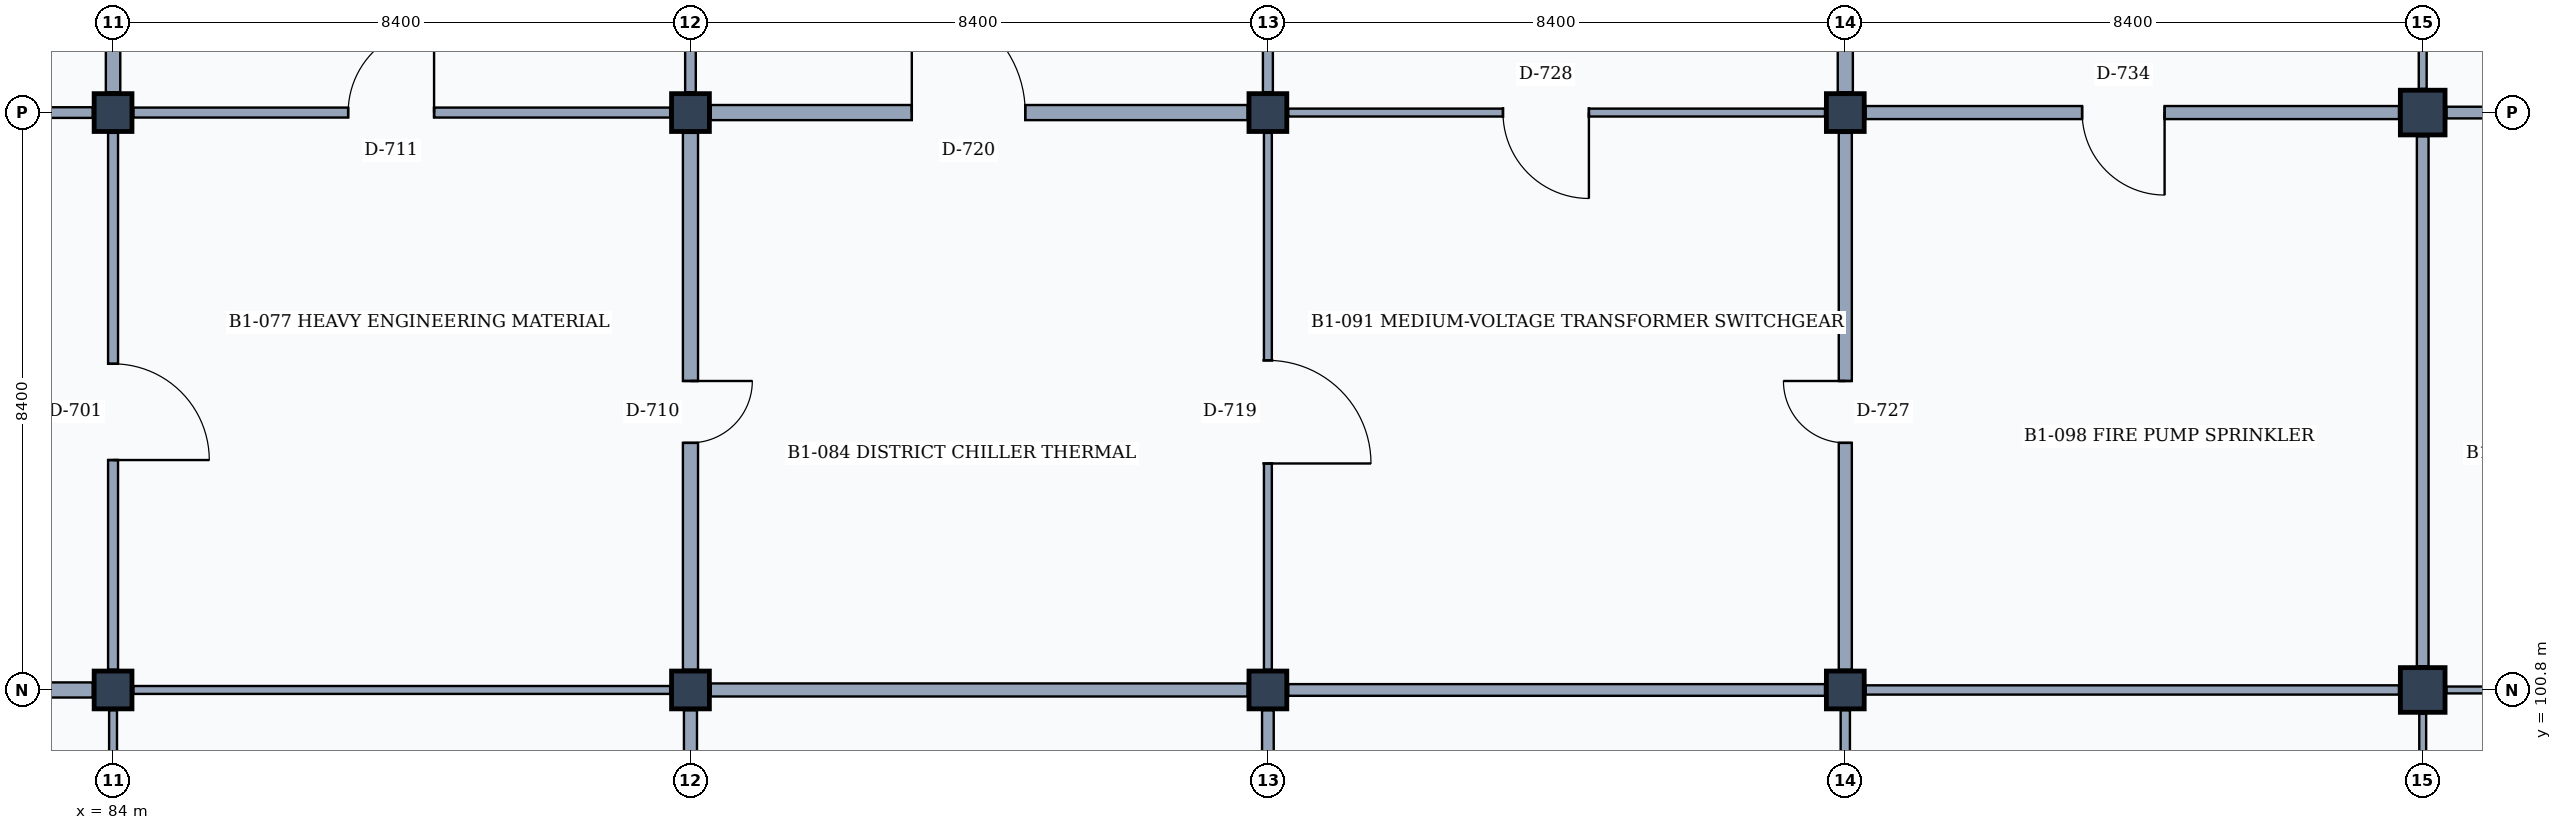
"""IFC4 building model, lengths in metres.
Left out: names, types, materials, properties, quantities, classifications, styles, units other than length and angle.
Written with IfcOpenShell. Run it as: python <this file> out.ifc"""

import sys

from ifc_helpers import new_model, si_unit, direction, frame, frame_2d, origin, origin_2d, place, context, subcontext, project, spatial, rectangle, extrude, element, fill, save


model = new_model("IFC4")
c1 = context("Model", 3, precision=1e-05, world=origin(), true_north=direction((0.0, 1.0)))
c2 = subcontext(c1, "Body", "Model", "MODEL_VIEW")
j1 = project(units=[si_unit("LENGTHUNIT", "METRE"), si_unit("PLANEANGLEUNIT", "RADIAN")], contexts=[c1])
p1 = place(None, origin())
s1 = spatial("IfcSite", under=j1, at=p1, CompositionType="ELEMENT")
p2 = place(p1, origin())
s2 = spatial("IfcBuilding", under=s1, at=p2, CompositionType="ELEMENT")
p3 = place(p2, frame((0.0, 0.0, -4.2)))
s3 = spatial("IfcBuildingStorey", under=s2, at=p3, CompositionType="ELEMENT", Elevation=-4.2)
for number, where, z_axis, x_axis in (
    (1, (84.0, 100.8, 0.0), (0.0, 0.0, 1.0), (1.0, 0.0, 0.0)),
    (2, (84.0, 109.2, 0.0), (0.0, 0.0, 1.0), (1.0, 0.0, 0.0)),
    (3, (92.4, 100.8, 0.0), (0.0, 0.0, 1.0), (1.0, 0.0, 0.0)),
    (4, (92.4, 109.2, 0.0), (0.0, 0.0, 1.0), (1.0, 0.0, 0.0)),
    (5, (100.8, 100.8, 0.0), (0.0, 0.0, 1.0), (1.0, 0.0, 0.0)),
    (6, (100.8, 109.2, 0.0), (0.0, 0.0, 1.0), (1.0, 0.0, 0.0)),
    (7, (109.2, 100.8, 0.0), (0.0, 0.0, 1.0), (1.0, 0.0, 0.0)),
    (8, (109.2, 109.2, 0.0), (0.0, 0.0, 1.0), (1.0, 0.0, 0.0)),
):
    element("IfcColumn", number, at=place(p3, frame(where, z_axis=z_axis, x_axis=x_axis)), inside=s3, PredefinedType="COLUMN", context=c2, shape_type="SweptSolid", body=[
        extrude(rectangle(XDim=0.55, YDim=0.55, at=origin_2d()), origin(), (0.0, 0.0, 1.0), 4.2),
    ])
for number, where, z_axis, x_axis in (
    (9, (117.6, 100.8, 0.0), (0.0, 0.0, 1.0), (1.0, 0.0, 0.0)),
    (10, (117.6, 109.2, 0.0), (0.0, 0.0, 1.0), (1.0, 0.0, 0.0)),
):
    element("IfcColumn", number, at=place(p3, frame(where, z_axis=z_axis, x_axis=x_axis)), inside=s3, PredefinedType="COLUMN", context=c2, shape_type="SweptSolid", body=[
        extrude(rectangle(XDim=0.65, YDim=0.65, at=origin_2d()), origin(), (0.0, 0.0, 1.0), 4.2),
    ])
p4 = place(p3, frame((84.0, 92.745, 0.0), z_axis=(0.0, 0.0, 1.0), x_axis=(0.0, 1.0, 0.0)))
e11 = element("IfcWall", 11, at=p4, inside=s3, PredefinedType="PARTITIONING", context=c2, shape_type="SweptSolid", body=[
    extrude(rectangle(XDim=7.76, YDim=0.115, at=frame_2d((3.88, 0.0))), origin(), (0.0, 0.0, 1.0), 3.23),
])
p5 = place(p4, frame((3.15, 0.0, 0.0)))
e12 = element("IfcOpeningElement", 12, at=p5, cuts=e11, PredefinedType="OPENING", context=c2, shape_type="SweptSolid", body=[
    extrude(rectangle(XDim=1.2, YDim=2.2, at=frame_2d((0.6, 1.1))), frame((0.0, 0.067, 0.0), z_axis=(0.0, -1.0, 0.0), x_axis=(1.0, 0.0, 0.0)), (0.0, 0.0, 1.0), 0.135),
])
p6 = place(p3, frame((75.895, 100.8, 0.0), z_axis=(0.0, 0.0, 1.0), x_axis=(1.0, 0.0, 0.0)))
e13 = element("IfcWall", 13, at=p6, inside=s3, PredefinedType="PARTITIONING", context=c2, shape_type="SweptSolid", body=[
    extrude(rectangle(XDim=7.81, YDim=0.22, at=frame_2d((3.905, 0.0))), origin(), (0.0, 0.0, 1.0), 2.93),
])
p7 = place(p3, frame((84.0, 101.095, 0.0), z_axis=(0.0, 0.0, 1.0), x_axis=(0.0, 1.0, 0.0)))
e14 = element("IfcWall", 14, at=p7, inside=s3, PredefinedType="PARTITIONING", context=c2, shape_type="SweptSolid", body=[
    extrude(rectangle(XDim=7.81, YDim=0.145, at=frame_2d((3.905, 0.0))), origin(), (0.0, 0.0, 1.0), 3.23),
])
p8 = place(p7, frame((3.05, 0.0, 0.0)))
e15 = element("IfcOpeningElement", 15, at=p8, cuts=e14, PredefinedType="OPENING", context=c2, shape_type="SweptSolid", body=[
    extrude(rectangle(XDim=1.4, YDim=2.25, at=frame_2d((0.7, 1.125))), frame((0.0, 0.083, 0.0), z_axis=(0.0, -1.0, 0.0), x_axis=(1.0, 0.0, 0.0)), (0.0, 0.0, 1.0), 0.165),
])
p9 = place(p3, frame((75.895, 109.2, 0.0), z_axis=(0.0, 0.0, 1.0), x_axis=(1.0, 0.0, 0.0)))
e16 = element("IfcWall", 16, at=p9, inside=s3, PredefinedType="PARTITIONING", context=c2, shape_type="SweptSolid", body=[
    extrude(rectangle(XDim=7.81, YDim=0.155, at=frame_2d((3.905, 0.0))), origin(), (0.0, 0.0, 1.0), 2.93),
])
p10 = place(p9, frame((3.0, 0.0, 0.0)))
e17 = element("IfcOpeningElement", 17, at=p10, cuts=e16, PredefinedType="OPENING", context=c2, shape_type="SweptSolid", body=[
    extrude(rectangle(XDim=1.5, YDim=2.3, at=frame_2d((0.75, 1.15))), frame((0.0, 0.087, 0.0), z_axis=(0.0, -1.0, 0.0), x_axis=(1.0, 0.0, 0.0)), (0.0, 0.0, 1.0), 0.175),
])
p11 = place(p3, frame((84.0, 109.495, 0.0), z_axis=(0.0, 0.0, 1.0), x_axis=(0.0, 1.0, 0.0)))
e18 = element("IfcWall", 18, at=p11, inside=s3, PredefinedType="PARTITIONING", context=c2, shape_type="SweptSolid", body=[
    extrude(rectangle(XDim=7.81, YDim=0.21, at=frame_2d((3.905, 0.0))), origin(), (0.0, 0.0, 1.0), 3.23),
])
p12 = place(p3, frame((92.4, 92.745, 0.0), z_axis=(0.0, 0.0, 1.0), x_axis=(0.0, 1.0, 0.0)))
e19 = element("IfcWall", 19, at=p12, inside=s3, PredefinedType="PARTITIONING", context=c2, shape_type="SweptSolid", body=[
    extrude(rectangle(XDim=7.76, YDim=0.19, at=frame_2d((3.88, 0.0))), origin(), (0.0, 0.0, 1.0), 3.23),
])
p13 = place(p12, frame((2.8, 0.0, 0.0)))
e20 = element("IfcOpeningElement", 20, at=p13, cuts=e19, PredefinedType="OPENING", context=c2, shape_type="SweptSolid", body=[
    extrude(rectangle(XDim=1.9, YDim=2.4, at=frame_2d((0.95, 1.2))), frame((0.0, 0.105, 0.0), z_axis=(0.0, -1.0, 0.0), x_axis=(1.0, 0.0, 0.0)), (0.0, 0.0, 1.0), 0.21),
])
p14 = place(p3, frame((84.295, 100.8, 0.0), z_axis=(0.0, 0.0, 1.0), x_axis=(1.0, 0.0, 0.0)))
e21 = element("IfcWall", 21, at=p14, inside=s3, PredefinedType="PARTITIONING", context=c2, shape_type="SweptSolid", body=[
    extrude(rectangle(XDim=7.81, YDim=0.115, at=frame_2d((3.905, 0.0))), origin(), (0.0, 0.0, 1.0), 2.93),
])
p15 = place(p3, frame((92.4, 101.095, 0.0), z_axis=(0.0, 0.0, 1.0), x_axis=(0.0, 1.0, 0.0)))
e22 = element("IfcWall", 22, at=p15, inside=s3, PredefinedType="PARTITIONING", context=c2, shape_type="SweptSolid", body=[
    extrude(rectangle(XDim=7.81, YDim=0.22, at=frame_2d((3.905, 0.0))), origin(), (0.0, 0.0, 1.0), 3.23),
])
p16 = place(p15, frame((3.3, 0.0, 0.0)))
e23 = element("IfcOpeningElement", 23, at=p16, cuts=e22, PredefinedType="OPENING", context=c2, shape_type="SweptSolid", body=[
    extrude(rectangle(XDim=0.9, YDim=2.1, at=frame_2d((0.45, 1.05))), frame((0.0, 0.12, 0.0), z_axis=(0.0, -1.0, 0.0), x_axis=(1.0, 0.0, 0.0)), (0.0, 0.0, 1.0), 0.24),
])
p17 = place(p3, frame((84.295, 109.2, 0.0), z_axis=(0.0, 0.0, 1.0), x_axis=(1.0, 0.0, 0.0)))
e24 = element("IfcWall", 24, at=p17, inside=s3, PredefinedType="PARTITIONING", context=c2, shape_type="SweptSolid", body=[
    extrude(rectangle(XDim=7.81, YDim=0.145, at=frame_2d((3.905, 0.0))), origin(), (0.0, 0.0, 1.0), 2.93),
])
p18 = place(p17, frame((3.125, 0.0, 0.0)))
e25 = element("IfcOpeningElement", 25, at=p18, cuts=e24, PredefinedType="OPENING", context=c2, shape_type="SweptSolid", body=[
    extrude(rectangle(XDim=1.25, YDim=2.3, at=frame_2d((0.625, 1.15))), frame((0.0, 0.083, 0.0), z_axis=(0.0, -1.0, 0.0), x_axis=(1.0, 0.0, 0.0)), (0.0, 0.0, 1.0), 0.165),
])
p19 = place(p3, frame((92.4, 109.495, 0.0), z_axis=(0.0, 0.0, 1.0), x_axis=(0.0, 1.0, 0.0)))
e26 = element("IfcWall", 26, at=p19, inside=s3, PredefinedType="PARTITIONING", context=c2, shape_type="SweptSolid", body=[
    extrude(rectangle(XDim=7.81, YDim=0.155, at=frame_2d((3.905, 0.0))), origin(), (0.0, 0.0, 1.0), 3.23),
])
p20 = place(p3, frame((100.8, 92.745, 0.0), z_axis=(0.0, 0.0, 1.0), x_axis=(0.0, 1.0, 0.0)))
e27 = element("IfcWall", 27, at=p20, inside=s3, PredefinedType="PARTITIONING", context=c2, shape_type="SweptSolid", body=[
    extrude(rectangle(XDim=7.76, YDim=0.17, at=frame_2d((3.88, 0.0))), origin(), (0.0, 0.0, 1.0), 3.23),
])
p21 = place(p20, frame((3.05, 0.0, 0.0)))
e28 = element("IfcOpeningElement", 28, at=p21, cuts=e27, PredefinedType="OPENING", context=c2, shape_type="SweptSolid", body=[
    extrude(rectangle(XDim=1.4, YDim=2.25, at=frame_2d((0.7, 1.125))), frame((0.0, 0.095, 0.0), z_axis=(0.0, -1.0, 0.0), x_axis=(1.0, 0.0, 0.0)), (0.0, 0.0, 1.0), 0.19),
])
p22 = place(p3, frame((92.695, 100.8, 0.0), z_axis=(0.0, 0.0, 1.0), x_axis=(1.0, 0.0, 0.0)))
e29 = element("IfcWall", 29, at=p22, inside=s3, PredefinedType="PARTITIONING", context=c2, shape_type="SweptSolid", body=[
    extrude(rectangle(XDim=7.81, YDim=0.19, at=frame_2d((3.905, 0.0))), origin(), (0.0, 0.0, 1.0), 2.93),
])
p23 = place(p3, frame((100.8, 101.095, 0.0), z_axis=(0.0, 0.0, 1.0), x_axis=(0.0, 1.0, 0.0)))
e30 = element("IfcWall", 30, at=p23, inside=s3, PredefinedType="PARTITIONING", context=c2, shape_type="SweptSolid", body=[
    extrude(rectangle(XDim=7.81, YDim=0.115, at=frame_2d((3.905, 0.0))), origin(), (0.0, 0.0, 1.0), 3.23),
])
p24 = place(p23, frame((3.0, 0.0, 0.0)))
e31 = element("IfcOpeningElement", 31, at=p24, cuts=e30, PredefinedType="OPENING", context=c2, shape_type="SweptSolid", body=[
    extrude(rectangle(XDim=1.5, YDim=2.3, at=frame_2d((0.75, 1.15))), frame((0.0, 0.067, 0.0), z_axis=(0.0, -1.0, 0.0), x_axis=(1.0, 0.0, 0.0)), (0.0, 0.0, 1.0), 0.135),
])
p25 = place(p3, frame((92.695, 109.2, 0.0), z_axis=(0.0, 0.0, 1.0), x_axis=(1.0, 0.0, 0.0)))
e32 = element("IfcWall", 32, at=p25, inside=s3, PredefinedType="PARTITIONING", context=c2, shape_type="SweptSolid", body=[
    extrude(rectangle(XDim=7.81, YDim=0.22, at=frame_2d((3.905, 0.0))), origin(), (0.0, 0.0, 1.0), 2.93),
])
p26 = place(p25, frame((2.925, 0.0, 0.0)))
e33 = element("IfcOpeningElement", 33, at=p26, cuts=e32, PredefinedType="OPENING", context=c2, shape_type="SweptSolid", body=[
    extrude(rectangle(XDim=1.65, YDim=2.25, at=frame_2d((0.825, 1.125))), frame((0.0, 0.12, 0.0), z_axis=(0.0, -1.0, 0.0), x_axis=(1.0, 0.0, 0.0)), (0.0, 0.0, 1.0), 0.24),
])
p27 = place(p3, frame((100.8, 109.495, 0.0), z_axis=(0.0, 0.0, 1.0), x_axis=(0.0, 1.0, 0.0)))
e34 = element("IfcWall", 34, at=p27, inside=s3, PredefinedType="PARTITIONING", context=c2, shape_type="SweptSolid", body=[
    extrude(rectangle(XDim=7.81, YDim=0.145, at=frame_2d((3.905, 0.0))), origin(), (0.0, 0.0, 1.0), 3.23),
])
p28 = place(p3, frame((109.2, 92.745, 0.0), z_axis=(0.0, 0.0, 1.0), x_axis=(0.0, 1.0, 0.0)))
e35 = element("IfcWall", 35, at=p28, inside=s3, PredefinedType="PARTITIONING", context=c2, shape_type="SweptSolid", body=[
    extrude(rectangle(XDim=7.76, YDim=0.135, at=frame_2d((3.88, 0.0))), origin(), (0.0, 0.0, 1.0), 3.23),
])
p29 = place(p28, frame((2.8, 0.0, 0.0)))
e36 = element("IfcOpeningElement", 36, at=p29, cuts=e35, PredefinedType="OPENING", context=c2, shape_type="SweptSolid", body=[
    extrude(rectangle(XDim=1.9, YDim=2.4, at=frame_2d((0.95, 1.2))), frame((0.0, 0.077, 0.0), z_axis=(0.0, -1.0, 0.0), x_axis=(1.0, 0.0, 0.0)), (0.0, 0.0, 1.0), 0.155),
])
p30 = place(p3, frame((101.095, 100.8, 0.0), z_axis=(0.0, 0.0, 1.0), x_axis=(1.0, 0.0, 0.0)))
e37 = element("IfcWall", 37, at=p30, inside=s3, PredefinedType="PARTITIONING", context=c2, shape_type="SweptSolid", body=[
    extrude(rectangle(XDim=7.81, YDim=0.17, at=frame_2d((3.905, 0.0))), origin(), (0.0, 0.0, 1.0), 2.93),
])
p31 = place(p3, frame((109.2, 101.095, 0.0), z_axis=(0.0, 0.0, 1.0), x_axis=(0.0, 1.0, 0.0)))
e38 = element("IfcWall", 38, at=p31, inside=s3, PredefinedType="PARTITIONING", context=c2, shape_type="SweptSolid", body=[
    extrude(rectangle(XDim=7.81, YDim=0.19, at=frame_2d((3.905, 0.0))), origin(), (0.0, 0.0, 1.0), 3.23),
])
p32 = place(p31, frame((3.3, 0.0, 0.0)))
e39 = element("IfcOpeningElement", 39, at=p32, cuts=e38, PredefinedType="OPENING", context=c2, shape_type="SweptSolid", body=[
    extrude(rectangle(XDim=0.9, YDim=2.1, at=frame_2d((0.45, 1.05))), frame((0.0, 0.105, 0.0), z_axis=(0.0, -1.0, 0.0), x_axis=(1.0, 0.0, 0.0)), (0.0, 0.0, 1.0), 0.21),
])
p33 = place(p3, frame((101.095, 109.2, 0.0), z_axis=(0.0, 0.0, 1.0), x_axis=(1.0, 0.0, 0.0)))
e40 = element("IfcWall", 40, at=p33, inside=s3, PredefinedType="PARTITIONING", context=c2, shape_type="SweptSolid", body=[
    extrude(rectangle(XDim=7.81, YDim=0.115, at=frame_2d((3.905, 0.0))), origin(), (0.0, 0.0, 1.0), 2.93),
])
p34 = place(p33, frame((3.125, 0.0, 0.0)))
e41 = element("IfcOpeningElement", 41, at=p34, cuts=e40, PredefinedType="OPENING", context=c2, shape_type="SweptSolid", body=[
    extrude(rectangle(XDim=1.25, YDim=2.3, at=frame_2d((0.625, 1.15))), frame((0.0, 0.067, 0.0), z_axis=(0.0, -1.0, 0.0), x_axis=(1.0, 0.0, 0.0)), (0.0, 0.0, 1.0), 0.135),
])
p35 = place(p3, frame((109.2, 109.495, 0.0), z_axis=(0.0, 0.0, 1.0), x_axis=(0.0, 1.0, 0.0)))
e42 = element("IfcWall", 42, at=p35, inside=s3, PredefinedType="PARTITIONING", context=c2, shape_type="SweptSolid", body=[
    extrude(rectangle(XDim=7.81, YDim=0.22, at=frame_2d((3.905, 0.0))), origin(), (0.0, 0.0, 1.0), 3.23),
])
p36 = place(p3, frame((117.6, 92.745, 0.0), z_axis=(0.0, 0.0, 1.0), x_axis=(0.0, 1.0, 0.0)))
e43 = element("IfcWall", 43, at=p36, inside=s3, PredefinedType="MOVABLE", context=c2, shape_type="SweptSolid", body=[
    extrude(rectangle(XDim=7.71, YDim=0.1, at=frame_2d((3.855, 0.0))), origin(), (0.0, 0.0, 1.0), 3.23),
])
p37 = place(p3, frame((109.495, 100.8, 0.0), z_axis=(0.0, 0.0, 1.0), x_axis=(1.0, 0.0, 0.0)))
e44 = element("IfcWall", 44, at=p37, inside=s3, PredefinedType="PARTITIONING", context=c2, shape_type="SweptSolid", body=[
    extrude(rectangle(XDim=7.76, YDim=0.135, at=frame_2d((3.88, 0.0))), origin(), (0.0, 0.0, 1.0), 2.93),
])
p38 = place(p3, frame((117.6, 101.145, 0.0), z_axis=(0.0, 0.0, 1.0), x_axis=(0.0, 1.0, 0.0)))
e45 = element("IfcWall", 45, at=p38, inside=s3, PredefinedType="PARTITIONING", context=c2, shape_type="SweptSolid", body=[
    extrude(rectangle(XDim=7.71, YDim=0.17, at=frame_2d((3.855, 0.0))), origin(), (0.0, 0.0, 1.0), 3.23),
])
p39 = place(p3, frame((109.495, 109.2, 0.0), z_axis=(0.0, 0.0, 1.0), x_axis=(1.0, 0.0, 0.0)))
e46 = element("IfcWall", 46, at=p39, inside=s3, PredefinedType="PARTITIONING", context=c2, shape_type="SweptSolid", body=[
    extrude(rectangle(XDim=7.76, YDim=0.19, at=frame_2d((3.88, 0.0))), origin(), (0.0, 0.0, 1.0), 2.93),
])
p40 = place(p39, frame((3.15, 0.0, 0.0)))
e47 = element("IfcOpeningElement", 47, at=p40, cuts=e46, PredefinedType="OPENING", context=c2, shape_type="SweptSolid", body=[
    extrude(rectangle(XDim=1.2, YDim=2.2, at=frame_2d((0.6, 1.1))), frame((0.0, 0.105, 0.0), z_axis=(0.0, -1.0, 0.0), x_axis=(1.0, 0.0, 0.0)), (0.0, 0.0, 1.0), 0.21),
])
p41 = place(p3, frame((117.6, 109.545, 0.0), z_axis=(0.0, 0.0, 1.0), x_axis=(0.0, 1.0, 0.0)))
e48 = element("IfcWall", 48, at=p41, inside=s3, PredefinedType="PARTITIONING", context=c2, shape_type="SweptSolid", body=[
    extrude(rectangle(XDim=7.71, YDim=0.115, at=frame_2d((3.855, 0.0))), origin(), (0.0, 0.0, 1.0), 3.23),
])
p42 = place(p3, frame((117.945, 100.8, 0.0), z_axis=(0.0, 0.0, 1.0), x_axis=(1.0, 0.0, 0.0)))
e49 = element("IfcWall", 49, at=p42, inside=s3, PredefinedType="MOVABLE", context=c2, shape_type="SweptSolid", body=[
    extrude(rectangle(XDim=7.71, YDim=0.1, at=frame_2d((3.855, 0.0))), origin(), (0.0, 0.0, 1.0), 2.93),
])
p43 = place(p3, frame((117.945, 109.2, 0.0), z_axis=(0.0, 0.0, 1.0), x_axis=(1.0, 0.0, 0.0)))
e50 = element("IfcWall", 50, at=p43, inside=s3, PredefinedType="PARTITIONING", context=c2, shape_type="SweptSolid", body=[
    extrude(rectangle(XDim=7.71, YDim=0.17, at=frame_2d((3.855, 0.0))), origin(), (0.0, 0.0, 1.0), 2.93),
])
p44 = place(p43, frame((2.9, 0.0, 0.0)))
e51 = element("IfcOpeningElement", 51, at=p44, cuts=e50, PredefinedType="OPENING", context=c2, shape_type="SweptSolid", body=[
    extrude(rectangle(XDim=1.7, YDim=2.3, at=frame_2d((0.85, 1.15))), frame((0.0, 0.095, 0.0), z_axis=(0.0, -1.0, 0.0), x_axis=(1.0, 0.0, 0.0)), (0.0, 0.0, 1.0), 0.19),
])
p45 = place(p8, frame((1.4, 0.0, 0.0), z_axis=(0.0, 0.0, 1.0), x_axis=(-1.0, 0.0, 0.0)))
e52 = element("IfcDoor", 52, at=p45, inside=s3, OperationType="SINGLE_SWING_RIGHT", PredefinedType="DOOR", context=c2, shape_type="SweptSolid", body=[
    extrude(rectangle(XDim=1.4, YDim=2.25, at=frame_2d((0.7, 1.125))), frame((0.0, 0.025, 0.0), z_axis=(0.0, -1.0, 0.0), x_axis=(1.0, 0.0, 0.0)), (0.0, 0.0, 1.0), 0.05),
])
fill(e15, e52)
p46 = place(p16, frame((0.9, 0.0, 0.0), z_axis=(0.0, 0.0, 1.0), x_axis=(-1.0, 0.0, 0.0)))
e53 = element("IfcDoor", 53, at=p46, inside=s3, OperationType="SINGLE_SWING_LEFT", PredefinedType="DOOR", context=c2, shape_type="SweptSolid", body=[
    extrude(rectangle(XDim=0.9, YDim=2.1, at=frame_2d((0.45, 1.05))), frame((0.0, 0.025, 0.0), z_axis=(0.0, -1.0, 0.0), x_axis=(1.0, 0.0, 0.0)), (0.0, 0.0, 1.0), 0.05),
])
fill(e23, e53)
p47 = place(p18, origin())
e54 = element("IfcDoor", 54, at=p47, inside=s3, OperationType="SINGLE_SWING_RIGHT", PredefinedType="DOOR", context=c2, shape_type="SweptSolid", body=[
    extrude(rectangle(XDim=1.25, YDim=2.3, at=frame_2d((0.625, 1.15))), frame((0.0, 0.025, 0.0), z_axis=(0.0, -1.0, 0.0), x_axis=(1.0, 0.0, 0.0)), (0.0, 0.0, 1.0), 0.05),
])
fill(e25, e54)
p48 = place(p24, frame((1.5, 0.0, 0.0), z_axis=(0.0, 0.0, 1.0), x_axis=(-1.0, 0.0, 0.0)))
e55 = element("IfcDoor", 55, at=p48, inside=s3, OperationType="SINGLE_SWING_RIGHT", PredefinedType="DOOR", context=c2, shape_type="SweptSolid", body=[
    extrude(rectangle(XDim=1.5, YDim=2.3, at=frame_2d((0.75, 1.15))), frame((0.0, 0.025, 0.0), z_axis=(0.0, -1.0, 0.0), x_axis=(1.0, 0.0, 0.0)), (0.0, 0.0, 1.0), 0.05),
])
fill(e31, e55)
p49 = place(p26, origin())
e56 = element("IfcDoor", 56, at=p49, inside=s3, OperationType="SINGLE_SWING_LEFT", PredefinedType="DOOR", context=c2, shape_type="SweptSolid", body=[
    extrude(rectangle(XDim=1.65, YDim=2.25, at=frame_2d((0.825, 1.125))), frame((0.0, 0.025, 0.0), z_axis=(0.0, -1.0, 0.0), x_axis=(1.0, 0.0, 0.0)), (0.0, 0.0, 1.0), 0.05),
])
fill(e33, e56)
p50 = place(p32, origin())
e57 = element("IfcDoor", 57, at=p50, inside=s3, OperationType="SINGLE_SWING_RIGHT", PredefinedType="DOOR", context=c2, shape_type="SweptSolid", body=[
    extrude(rectangle(XDim=0.9, YDim=2.1, at=frame_2d((0.45, 1.05))), frame((0.0, 0.025, 0.0), z_axis=(0.0, -1.0, 0.0), x_axis=(1.0, 0.0, 0.0)), (0.0, 0.0, 1.0), 0.05),
])
fill(e39, e57)
p51 = place(p34, frame((1.25, 0.0, 0.0), z_axis=(0.0, 0.0, 1.0), x_axis=(-1.0, 0.0, 0.0)))
e58 = element("IfcDoor", 58, at=p51, inside=s3, OperationType="SINGLE_SWING_LEFT", PredefinedType="DOOR", context=c2, shape_type="SweptSolid", body=[
    extrude(rectangle(XDim=1.25, YDim=2.3, at=frame_2d((0.625, 1.15))), frame((0.0, 0.025, 0.0), z_axis=(0.0, -1.0, 0.0), x_axis=(1.0, 0.0, 0.0)), (0.0, 0.0, 1.0), 0.05),
])
fill(e41, e58)
p52 = place(p40, frame((1.2, 0.0, 0.0), z_axis=(0.0, 0.0, 1.0), x_axis=(-1.0, 0.0, 0.0)))
e59 = element("IfcDoor", 59, at=p52, inside=s3, OperationType="SINGLE_SWING_LEFT", PredefinedType="DOOR", context=c2, shape_type="SweptSolid", body=[
    extrude(rectangle(XDim=1.2, YDim=2.2, at=frame_2d((0.6, 1.1))), frame((0.0, 0.025, 0.0), z_axis=(0.0, -1.0, 0.0), x_axis=(1.0, 0.0, 0.0)), (0.0, 0.0, 1.0), 0.05),
])
fill(e47, e59)
save(model, sys.argv[1])
